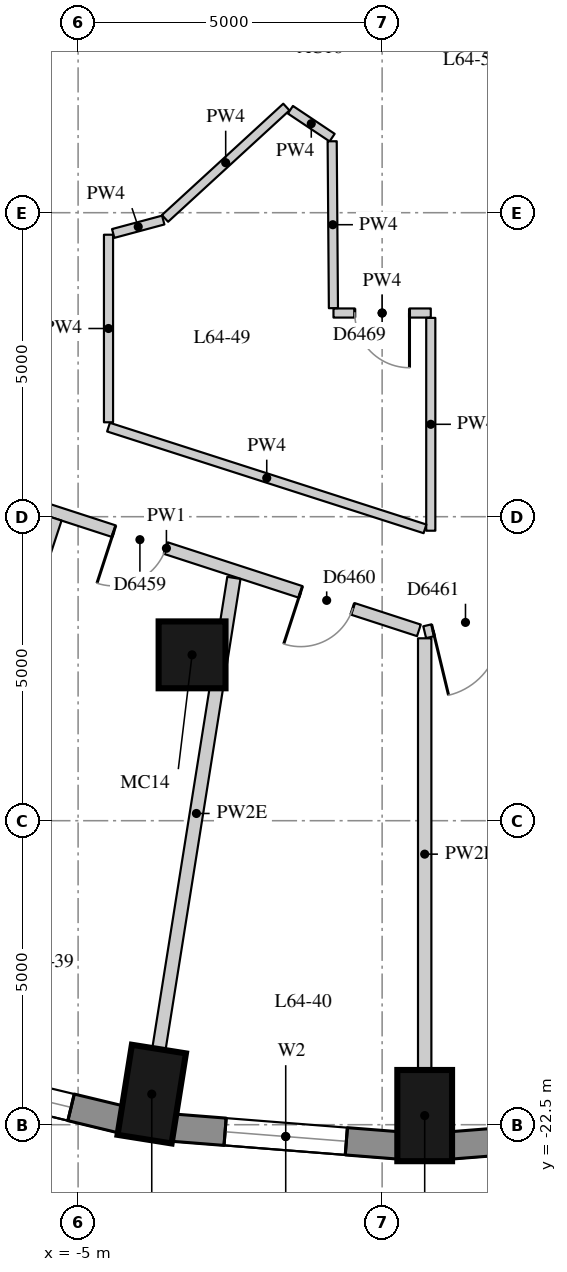
"""IFC4 building model, lengths in metres.
Left out: names, types, materials, properties, quantities, classifications, styles, units other than length and angle.
Written with IfcOpenShell. Run it as: python <this file> out.ifc"""

import sys

from ifc_helpers import new_model, si_unit, direction, frame, frame_2d, origin, origin_2d, place, context, subcontext, project, spatial, rectangle, extrude, element, fill, save


model = new_model("IFC4")
c1 = context("Model", 3, precision=1e-05, world=origin(), true_north=direction((0.0, 1.0)))
c2 = subcontext(c1, "Body", "Model", "MODEL_VIEW")
j1 = project(units=[si_unit("LENGTHUNIT", "METRE"), si_unit("PLANEANGLEUNIT", "RADIAN")], contexts=[c1])
p1 = place(None, origin())
s1 = spatial("IfcSite", under=j1, at=p1, CompositionType="ELEMENT")
p2 = place(p1, origin())
s2 = spatial("IfcBuilding", under=s1, at=p2, CompositionType="ELEMENT")
p3 = place(p2, frame((0.0, 0.0, 225.5)))
s3 = spatial("IfcBuildingStorey", under=s2, at=p3, CompositionType="ELEMENT", Elevation=225.5)
for number, where, z_axis, x_axis in (
    (1, (-3.789, -21.997, 0.0), (0.0, 0.0, 1.0), (-0.157, -0.988, 0.0)),
    (2, (0.7, -22.35, 0.0), (0.0, 0.0, 1.0), (0.0, -1.0, 0.0)),
):
    element("IfcColumn", number, at=place(p3, frame(where, z_axis=z_axis, x_axis=x_axis)), inside=s3, PredefinedType="COLUMN", context=c2, shape_type="SweptSolid", body=[
        extrude(rectangle(XDim=1.5, YDim=0.9, at=origin_2d()), origin(), (0.0, 0.0, 1.0), 3.3),
    ])
p4 = place(p3, frame((-3.126, -14.772, 0.0), z_axis=(0.0, 0.0, 1.0), x_axis=(1.0, 0.0, 0.0)))
e3 = element("IfcColumn", 3, at=p4, inside=s3, PredefinedType="COLUMN", context=c2, shape_type="SweptSolid", body=[
    extrude(rectangle(XDim=1.1, YDim=1.1, at=origin_2d()), origin(), (0.0, 0.0, 1.0), 3.3),
])
p5 = place(p3, frame((-7.885, -21.547, 0.0), z_axis=(0.0, 0.0, 1.0), x_axis=(0.9721584944, -0.234324266275, 0.0)))
e4 = element("IfcWall", 4, at=p5, inside=s3, PredefinedType="SOLIDWALL", context=c2, shape_type="SweptSolid", body=[
    extrude(rectangle(XDim=3.698, YDim=0.45, at=frame_2d((1.849, 0.0))), origin(), (0.0, 0.0, 1.0), 2.85),
])
p6 = place(p5, frame((0.849, 0.0, 0.4)))
e5 = element("IfcOpeningElement", 5, at=p6, cuts=e4, PredefinedType="OPENING", context=c2, shape_type="SweptSolid", body=[
    extrude(rectangle(XDim=2.0, YDim=1.75, at=frame_2d((1.0, 0.875))), frame((0.0, 0.235, 0.0), z_axis=(0.0, -1.0, 0.0), x_axis=(1.0, 0.0, 0.0)), (0.0, 0.0, 1.0), 0.47),
])
p7 = place(p3, frame((-3.441, -22.548, 0.0), z_axis=(0.0, 0.0, 1.0), x_axis=(0.996913971077, -0.078501810629, 0.0)))
e6 = element("IfcWall", 6, at=p7, inside=s3, PredefinedType="SOLIDWALL", context=c2, shape_type="SweptSolid", body=[
    extrude(rectangle(XDim=3.723, YDim=0.45, at=frame_2d((1.861, 0.0))), origin(), (0.0, 0.0, 1.0), 2.85),
])
p8 = place(p7, frame((0.861, 0.0, 0.4)))
e7 = element("IfcOpeningElement", 7, at=p8, cuts=e6, PredefinedType="OPENING", context=c2, shape_type="SweptSolid", body=[
    extrude(rectangle(XDim=2.0, YDim=1.75, at=frame_2d((1.0, 0.875))), frame((0.0, 0.235, 0.0), z_axis=(0.0, -1.0, 0.0), x_axis=(1.0, 0.0, 0.0)), (0.0, 0.0, 1.0), 0.47),
])
p9 = place(p3, frame((1.13, -22.841, 0.0), z_axis=(0.0, 0.0, 1.0), x_axis=(0.996913566885, 0.078506943392, 0.0)))
e8 = element("IfcWall", 8, at=p9, inside=s3, PredefinedType="SOLIDWALL", context=c2, shape_type="SweptSolid", body=[
    extrude(rectangle(XDim=3.722, YDim=0.45, at=frame_2d((1.861, 0.0))), origin(), (0.0, 0.0, 1.0), 2.85),
])
p10 = place(p9, frame((0.861, 0.0, 0.4)))
e9 = element("IfcOpeningElement", 9, at=p10, cuts=e8, PredefinedType="OPENING", context=c2, shape_type="SweptSolid", body=[
    extrude(rectangle(XDim=2.0, YDim=1.75, at=frame_2d((1.0, 0.875))), frame((0.0, 0.235, 0.0), z_axis=(0.0, -1.0, 0.0), x_axis=(1.0, 0.0, 0.0)), (0.0, 0.0, 1.0), 0.47),
])
p11 = place(p3, frame((9.922, -12.183, 0.0), z_axis=(0.0, 0.0, 1.0), x_axis=(-0.972292362394, -0.233768180104, 0.0)))
e10 = element("IfcWall", 10, at=p11, inside=s3, PredefinedType="PARTITIONING", context=c2, shape_type="SweptSolid", body=[
    extrude(rectangle(XDim=9.485, YDim=0.2, at=frame_2d((4.742, 0.0))), origin(), (0.0, 0.0, 1.0), 2.25),
])
p12 = place(p11, frame((8.245, 0.0, 0.0)))
e11 = element("IfcOpeningElement", 11, at=p12, cuts=e10, PredefinedType="OPENING", context=c2, shape_type="SweptSolid", body=[
    extrude(rectangle(XDim=1.1, YDim=2.1, at=frame_2d((0.55, 1.05))), frame((0.0, 0.11, 0.0), z_axis=(0.0, -1.0, 0.0), x_axis=(1.0, 0.0, 0.0)), (0.0, 0.0, 1.0), 0.22),
])
p13 = place(p3, frame((0.605, -14.369, 0.0), z_axis=(0.0, 0.0, 1.0), x_axis=(-0.950994614205, 0.309207444529, 0.0)))
e12 = element("IfcWall", 12, at=p13, inside=s3, PredefinedType="PARTITIONING", context=c2, shape_type="SweptSolid", body=[
    extrude(rectangle(XDim=8.733, YDim=0.2, at=frame_2d((4.366, 0.0))), origin(), (0.0, 0.0, 1.0), 2.85),
])
p14 = place(p13, frame((7.04, 0.0, 0.0)))
e13 = element("IfcOpeningElement", 13, at=p14, cuts=e12, PredefinedType="OPENING", context=c2, shape_type="SweptSolid", body=[
    extrude(rectangle(XDim=0.9, YDim=2.1, at=frame_2d((0.45, 1.05))), frame((0.0, 0.11, 0.0), z_axis=(0.0, -1.0, 0.0), x_axis=(1.0, 0.0, 0.0)), (0.0, 0.0, 1.0), 0.22),
])
p15 = place(p13, frame((4.375, 0.0, 0.0)))
e14 = element("IfcOpeningElement", 14, at=p15, cuts=e12, PredefinedType="OPENING", context=c2, shape_type="SweptSolid", body=[
    extrude(rectangle(XDim=0.9, YDim=2.1, at=frame_2d((0.45, 1.05))), frame((0.0, 0.11, 0.0), z_axis=(0.0, -1.0, 0.0), x_axis=(1.0, 0.0, 0.0)), (0.0, 0.0, 1.0), 0.22),
])
p16 = place(p13, frame((1.145, 0.0, 0.0)))
e15 = element("IfcOpeningElement", 15, at=p16, cuts=e12, PredefinedType="OPENING", context=c2, shape_type="SweptSolid", body=[
    extrude(rectangle(XDim=0.9, YDim=2.1, at=frame_2d((0.45, 1.05))), frame((0.0, 0.11, 0.0), z_axis=(0.0, -1.0, 0.0), x_axis=(1.0, 0.0, 0.0)), (0.0, 0.0, 1.0), 0.22),
])
p17 = place(p3, frame((-0.8, -9.15, 0.0), z_axis=(0.0, 0.0, 1.0), x_axis=(1.0, 0.0, 0.0)))
e16 = element("IfcWall", 16, at=p17, inside=s3, PredefinedType="PARTITIONING", context=c2, shape_type="SweptSolid", body=[
    extrude(rectangle(XDim=1.6, YDim=0.15, at=frame_2d((0.8, 0.0))), origin(), (0.0, 0.0, 1.0), 2.85),
])
p18 = place(p17, frame((0.35, 0.0, 0.0)))
e17 = element("IfcOpeningElement", 17, at=p18, cuts=e16, PredefinedType="OPENING", context=c2, shape_type="SweptSolid", body=[
    extrude(rectangle(XDim=0.9, YDim=2.1, at=frame_2d((0.45, 1.05))), frame((0.0, 0.085, 0.0), z_axis=(0.0, -1.0, 0.0), x_axis=(1.0, 0.0, 0.0)), (0.0, 0.0, 1.0), 0.17),
])
p19 = place(p3, frame((0.8, -9.23, 0.0), z_axis=(0.0, 0.0, 1.0), x_axis=(0.0, -1.0, 0.0)))
e18 = element("IfcWall", 18, at=p19, inside=s3, PredefinedType="PARTITIONING", context=c2, shape_type="SweptSolid", body=[
    extrude(rectangle(XDim=3.5, YDim=0.15, at=frame_2d((1.75, 0.0))), origin(), (0.0, 0.0, 1.0), 2.85),
])
p20 = place(p3, frame((0.705, -12.7, 0.0), z_axis=(0.0, 0.0, 1.0), x_axis=(-0.952035530576, 0.305987497327, 0.0)))
e19 = element("IfcWall", 19, at=p20, inside=s3, PredefinedType="PARTITIONING", context=c2, shape_type="SweptSolid", body=[
    extrude(rectangle(XDim=5.467, YDim=0.15, at=frame_2d((2.733, 0.0))), origin(), (0.0, 0.0, 1.0), 2.85),
])
p21 = place(p3, frame((-4.5, -10.947, 0.0), z_axis=(0.0, 0.0, 1.0), x_axis=(0.0, 1.0, 0.0)))
e20 = element("IfcWall", 20, at=p21, inside=s3, PredefinedType="PARTITIONING", context=c2, shape_type="SweptSolid", body=[
    extrude(rectangle(XDim=3.085, YDim=0.15, at=frame_2d((1.542, 0.0))), origin(), (0.0, 0.0, 1.0), 2.85),
])
p22 = place(p3, frame((-4.423, -7.842, 0.0), z_axis=(0.0, 0.0, 1.0), x_axis=(0.965853333569, 0.259089440221, 0.0)))
e21 = element("IfcWall", 21, at=p22, inside=s3, PredefinedType="PARTITIONING", context=c2, shape_type="SweptSolid", body=[
    extrude(rectangle(XDim=0.852, YDim=0.15, at=frame_2d((0.426, 0.0))), origin(), (0.0, 0.0, 1.0), 2.85),
])
p23 = place(p3, frame((-3.571, -7.594, 0.0), z_axis=(0.0, 0.0, 1.0), x_axis=(0.736783660812, 0.676128565555, 0.0)))
e22 = element("IfcWall", 22, at=p23, inside=s3, PredefinedType="PARTITIONING", context=c2, shape_type="SweptSolid", body=[
    extrude(rectangle(XDim=2.709, YDim=0.15, at=frame_2d((1.354, 0.0))), origin(), (0.0, 0.0, 1.0), 2.85),
])
p24 = place(p3, frame((-1.509, -5.806, 0.0), z_axis=(0.0, 0.0, 1.0), x_axis=(0.831367153095, -0.55572354346, 0.0)))
e23 = element("IfcWall", 23, at=p24, inside=s3, PredefinedType="PARTITIONING", context=c2, shape_type="SweptSolid", body=[
    extrude(rectangle(XDim=0.825, YDim=0.15, at=frame_2d((0.413, 0.0))), origin(), (0.0, 0.0, 1.0), 2.85),
])
p25 = place(p3, frame((-0.822, -6.325, 0.0), z_axis=(0.0, 0.0, 1.0), x_axis=(0.007471771501, -0.999972085926, 0.0)))
e24 = element("IfcWall", 24, at=p25, inside=s3, PredefinedType="PARTITIONING", context=c2, shape_type="SweptSolid", body=[
    extrude(rectangle(XDim=2.745, YDim=0.15, at=frame_2d((1.372, 0.0))), origin(), (0.0, 0.0, 1.0), 2.85),
])
p26 = place(p3, frame((-7.907, -20.235, 0.0), z_axis=(0.0, 0.0, 1.0), x_axis=(0.311998426629, 0.950082618397, 0.0)))
e25 = element("IfcWall", 25, at=p26, inside=s3, PredefinedType="PARTITIONING", context=c2, shape_type="SweptSolid", body=[
    extrude(rectangle(XDim=8.111, YDim=0.22, at=frame_2d((4.055, 0.0))), origin(), (0.0, 0.0, 1.0), 2.85),
])
p27 = place(p3, frame((-3.671, -21.256, 0.0), z_axis=(0.0, 0.0, 1.0), x_axis=(0.1571047049, 0.98758195189, 0.0)))
e26 = element("IfcWall", 26, at=p27, inside=s3, PredefinedType="PARTITIONING", context=c2, shape_type="SweptSolid", body=[
    extrude(rectangle(XDim=7.848, YDim=0.22, at=frame_2d((3.924, 0.0))), origin(), (0.0, 0.0, 1.0), 2.4),
])
p28 = place(p3, frame((0.7, -21.6, 0.0), z_axis=(0.0, 0.0, 1.0), x_axis=(0.0, 1.0, 0.0)))
e27 = element("IfcWall", 27, at=p28, inside=s3, PredefinedType="PARTITIONING", context=c2, shape_type="SweptSolid", body=[
    extrude(rectangle(XDim=7.1, YDim=0.22, at=frame_2d((3.55, 0.0))), origin(), (0.0, 0.0, 1.0), 2.4),
])
p29 = place(p3, frame((-4.073, -3.927, 0.0), z_axis=(0.0, 0.0, 1.0), x_axis=(-0.923860025149, -0.382730523909, 0.0)))
e28 = element("IfcWall", 28, at=p29, inside=s3, PredefinedType="PARTITIONING", context=c2, shape_type="SweptSolid", body=[
    extrude(rectangle(XDim=4.251, YDim=0.1, at=frame_2d((2.125, 0.0))), origin(), (0.0, 0.0, 1.0), 2.85),
])
p30 = place(p6, origin())
e29 = element("IfcWindow", 29, at=p30, inside=s3, PartitioningType="SINGLE_PANEL", PredefinedType="WINDOW", context=c2, shape_type="SweptSolid", body=[
    extrude(rectangle(XDim=2.0, YDim=1.75, at=frame_2d((1.0, 0.875))), frame((0.0, 0.035, 0.0), z_axis=(0.0, -1.0, 0.0), x_axis=(1.0, 0.0, 0.0)), (0.0, 0.0, 1.0), 0.06),
])
fill(e5, e29)
p31 = place(p8, origin())
e30 = element("IfcWindow", 30, at=p31, inside=s3, PartitioningType="SINGLE_PANEL", PredefinedType="WINDOW", context=c2, shape_type="SweptSolid", body=[
    extrude(rectangle(XDim=2.0, YDim=1.75, at=frame_2d((1.0, 0.875))), frame((0.0, 0.035, 0.0), z_axis=(0.0, -1.0, 0.0), x_axis=(1.0, 0.0, 0.0)), (0.0, 0.0, 1.0), 0.06),
])
fill(e7, e30)
p32 = place(p15, origin())
e31 = element("IfcDoor", 31, at=p32, inside=s3, OperationType="SINGLE_SWING_RIGHT", PredefinedType="DOOR", context=c2, shape_type="SweptSolid", body=[
    extrude(rectangle(XDim=0.9, YDim=2.1, at=frame_2d((0.45, 1.05))), frame((0.0, 0.025, 0.0), z_axis=(0.0, -1.0, 0.0), x_axis=(1.0, 0.0, 0.0)), (0.0, 0.0, 1.0), 0.05),
])
fill(e14, e31)
p33 = place(p16, origin())
e32 = element("IfcDoor", 32, at=p33, inside=s3, OperationType="SINGLE_SWING_RIGHT", PredefinedType="DOOR", context=c2, shape_type="SweptSolid", body=[
    extrude(rectangle(XDim=0.9, YDim=2.1, at=frame_2d((0.45, 1.05))), frame((0.0, 0.025, 0.0), z_axis=(0.0, -1.0, 0.0), x_axis=(1.0, 0.0, 0.0)), (0.0, 0.0, 1.0), 0.05),
])
fill(e15, e32)
p34 = place(p12, origin())
e33 = element("IfcDoor", 33, at=p34, inside=s3, OperationType="SINGLE_SWING_RIGHT", PredefinedType="DOOR", context=c2, shape_type="SweptSolid", body=[
    extrude(rectangle(XDim=1.1, YDim=2.1, at=frame_2d((0.55, 1.05))), frame((0.0, 0.025, 0.0), z_axis=(0.0, -1.0, 0.0), x_axis=(1.0, 0.0, 0.0)), (0.0, 0.0, 1.0), 0.05),
])
fill(e11, e33)
p35 = place(p18, origin())
e34 = element("IfcDoor", 34, at=p35, inside=s3, OperationType="SINGLE_SWING_LEFT", PredefinedType="DOOR", context=c2, shape_type="SweptSolid", body=[
    extrude(rectangle(XDim=0.9, YDim=2.1, at=frame_2d((0.45, 1.05))), frame((0.0, 0.025, 0.0), z_axis=(0.0, -1.0, 0.0), x_axis=(1.0, 0.0, 0.0)), (0.0, 0.0, 1.0), 0.05),
])
fill(e17, e34)
save(model, sys.argv[1])
